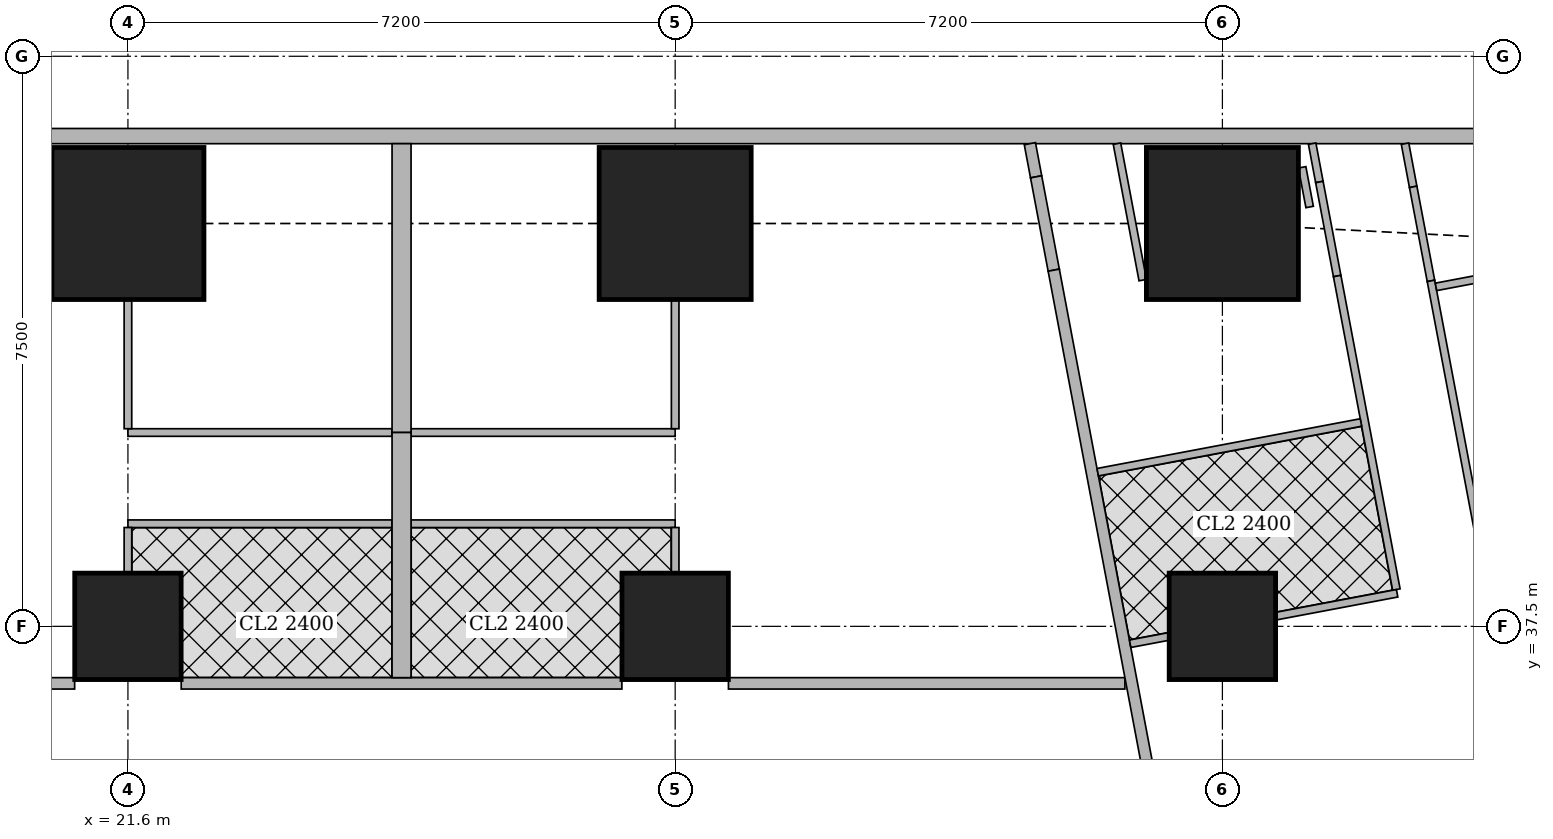
"""IFC4 building model, lengths in metres.
Left out: names, types, materials, properties, quantities, classifications, styles, units other than length and angle.
Written with IfcOpenShell. Run it as: python <this file> out.ifc"""

import sys

from ifc_helpers import new_model, si_unit, direction, frame, frame_2d, origin, origin_2d, place, context, subcontext, project, spatial, rectangle, extrude, element, fill, save


model = new_model("IFC4")
c1 = context("Model", 3, precision=1e-05, world=origin(), true_north=direction((0.0, 1.0)))
c2 = subcontext(c1, "Body", "Model", "MODEL_VIEW")
j1 = project(units=[si_unit("LENGTHUNIT", "METRE"), si_unit("PLANEANGLEUNIT", "RADIAN")], contexts=[c1])
p1 = place(None, origin())
s1 = spatial("IfcSite", under=j1, at=p1, CompositionType="ELEMENT")
p2 = place(p1, origin())
s2 = spatial("IfcBuilding", under=s1, at=p2, CompositionType="ELEMENT")
p3 = place(p2, frame((0.0, 0.0, 251.6)))
s3 = spatial("IfcBuildingStorey", under=s2, at=p3, CompositionType="ELEMENT", Elevation=251.6)
for number, where, z_axis, x_axis in (
    (1, (21.6, 37.5, 0.0), (0.0, 0.0, 1.0), (1.0, 0.0, 0.0)),
    (2, (28.8, 37.5, 0.0), (0.0, 0.0, 1.0), (1.0, 0.0, 0.0)),
    (3, (36.0, 37.5, 0.0), (0.0, 0.0, 1.0), (1.0, 0.0, 0.0)),
):
    element("IfcColumn", number, at=place(p3, frame(where, z_axis=z_axis, x_axis=x_axis)), inside=s3, PredefinedType="COLUMN", context=c2, shape_type="SweptSolid", body=[
        extrude(rectangle(XDim=1.4, YDim=1.4, at=origin_2d()), origin(), (0.0, 0.0, 1.0), 3.75),
    ])
for number, where, z_axis, x_axis in (
    (4, (21.6, 42.8, -0.25), (0.0, 0.0, 1.0), (1.0, 0.0, 0.0)),
    (5, (28.8, 42.8, -0.25), (0.0, 0.0, 1.0), (1.0, 0.0, 0.0)),
    (6, (36.0, 42.8, -0.25), (0.0, 0.0, 1.0), (1.0, 0.0, 0.0)),
):
    element("IfcColumn", number, at=place(p3, frame(where, z_axis=z_axis, x_axis=x_axis)), inside=s3, PredefinedType="COLUMN", context=c2, shape_type="SweptSolid", body=[
        extrude(rectangle(XDim=2.0, YDim=2.0, at=origin_2d()), origin(), (0.0, 0.0, 1.0), 4.0),
    ])
p4 = place(p3, frame((42.103, 43.95, 0.0), z_axis=(0.0, 0.0, 1.0), x_axis=(-1.0, 0.0, 0.0)))
e7 = element("IfcWall", 7, at=p4, inside=s3, PredefinedType="SOLIDWALL", context=c2, shape_type="SweptSolid", body=[
    extrude(rectangle(XDim=27.54, YDim=0.2, at=frame_2d((13.77, 0.0))), origin(), (0.0, 0.0, 1.0), 3.5),
])
p5 = place(p4, frame((10.603, 0.0, 0.9)))
e8 = element("IfcOpeningElement", 8, at=p5, cuts=e7, PredefinedType="OPENING", context=c2, shape_type="SweptSolid", body=[
    extrude(rectangle(XDim=1.8, YDim=1.5, at=frame_2d((0.9, 0.75))), frame((0.0, 0.11, 0.0), z_axis=(0.0, -1.0, 0.0), x_axis=(1.0, 0.0, 0.0)), (0.0, 0.0, 1.0), 0.22),
])
p6 = place(p4, frame((14.203, 0.0, 0.9)))
e9 = element("IfcOpeningElement", 9, at=p6, cuts=e7, PredefinedType="OPENING", context=c2, shape_type="SweptSolid", body=[
    extrude(rectangle(XDim=1.8, YDim=1.5, at=frame_2d((0.9, 0.75))), frame((0.0, 0.11, 0.0), z_axis=(0.0, -1.0, 0.0), x_axis=(1.0, 0.0, 0.0)), (0.0, 0.0, 1.0), 0.22),
])
p7 = place(p4, frame((17.803, 0.0, 0.9)))
e10 = element("IfcOpeningElement", 10, at=p7, cuts=e7, PredefinedType="OPENING", context=c2, shape_type="SweptSolid", body=[
    extrude(rectangle(XDim=1.8, YDim=1.5, at=frame_2d((0.9, 0.75))), frame((0.0, 0.11, 0.0), z_axis=(0.0, -1.0, 0.0), x_axis=(1.0, 0.0, 0.0)), (0.0, 0.0, 1.0), 0.22),
])
p8 = place(p4, frame((22.822, 0.0, 0.9)))
e11 = element("IfcOpeningElement", 11, at=p8, cuts=e7, PredefinedType="OPENING", context=c2, shape_type="SweptSolid", body=[
    extrude(rectangle(XDim=2.4, YDim=1.5, at=frame_2d((1.2, 0.75))), frame((0.0, 0.11, 0.0), z_axis=(0.0, -1.0, 0.0), x_axis=(1.0, 0.0, 0.0)), (0.0, 0.0, 1.0), 0.22),
])
p9 = place(p3, frame((16.001, 36.75, 0.0), z_axis=(0.0, 0.0, 1.0), x_axis=(1.0, 0.0, 0.0)))
e12 = element("IfcWall", 12, at=p9, inside=s3, PredefinedType="SOLIDWALL", context=c2, shape_type="SweptSolid", body=[
    extrude(rectangle(XDim=4.898, YDim=0.15, at=frame_2d((2.449, 0.0))), origin(), (0.0, 0.0, 1.0), 3.5),
])
p10 = place(p9, frame((1.074, 0.0, 0.0)))
e13 = element("IfcOpeningElement", 13, at=p10, cuts=e12, PredefinedType="OPENING", context=c2, shape_type="SweptSolid", body=[
    extrude(rectangle(XDim=1.0, YDim=2.1, at=frame_2d((0.5, 1.05))), frame((0.0, 0.085, 0.0), z_axis=(0.0, -1.0, 0.0), x_axis=(1.0, 0.0, 0.0)), (0.0, 0.0, 1.0), 0.17),
])
p11 = place(p3, frame((22.301, 36.75, 0.0), z_axis=(0.0, 0.0, 1.0), x_axis=(1.0, 0.0, 0.0)))
e14 = element("IfcWall", 14, at=p11, inside=s3, PredefinedType="SOLIDWALL", context=c2, shape_type="SweptSolid", body=[
    extrude(rectangle(XDim=5.798, YDim=0.15, at=frame_2d((2.899, 0.0))), origin(), (0.0, 0.0, 1.0), 3.5),
])
p12 = place(p3, frame((29.501, 36.75, 0.0), z_axis=(0.0, 0.0, 1.0), x_axis=(1.0, 0.0, 0.0)))
e15 = element("IfcWall", 15, at=p12, inside=s3, PredefinedType="SOLIDWALL", context=c2, shape_type="SweptSolid", body=[
    extrude(rectangle(XDim=5.216, YDim=0.15, at=frame_2d((2.608, 0.0))), origin(), (0.0, 0.0, 1.0), 3.5),
])
p13 = place(p12, frame((1.803, 0.0, 0.0)))
e16 = element("IfcOpeningElement", 16, at=p13, cuts=e15, PredefinedType="OPENING", context=c2, shape_type="SweptSolid", body=[
    extrude(rectangle(XDim=1.0, YDim=2.1, at=frame_2d((0.5, 1.05))), frame((0.0, 0.085, 0.0), z_axis=(0.0, -1.0, 0.0), x_axis=(1.0, 0.0, 0.0)), (0.0, 0.0, 1.0), 0.17),
])
p14 = place(p3, frame((33.467, 43.85, 0.0), z_axis=(0.0, 0.0, 1.0), x_axis=(0.184886516626, -0.982759877066, 0.0)))
e17 = element("IfcWall", 17, at=p14, inside=s3, PredefinedType="SOLIDWALL", context=c2, shape_type="SweptSolid", body=[
    extrude(rectangle(XDim=0.444, YDim=0.15, at=frame_2d((0.222, 0.0))), origin(), (0.0, 0.0, 1.0), 3.5),
])
p15 = place(p3, frame((33.549, 43.414, 0.0), z_axis=(0.0, 0.0, 1.0), x_axis=(0.185585816539, -0.982628060204, 0.0)))
e18 = element("IfcWall", 18, at=p15, inside=s3, PredefinedType="SOLIDWALL", context=c2, shape_type="SweptSolid", body=[
    extrude(rectangle(XDim=1.25, YDim=0.15, at=frame_2d((0.625, 0.0))), origin(), (0.0, 0.0, 1.0), 2.05),
])
p16 = place(p3, frame((33.781, 42.186, 0.0), z_axis=(0.0, 0.0, 1.0), x_axis=(0.185593518645, -0.9826266055, 0.0)))
e19 = element("IfcWall", 19, at=p16, inside=s3, PredefinedType="SOLIDWALL", context=c2, shape_type="SweptSolid", body=[
    extrude(rectangle(XDim=35.961, YDim=0.15, at=frame_2d((17.98, 0.0))), origin(), (0.0, 0.0, 1.0), 2.5),
])
p17 = place(p16, frame((7.183, 0.0, 0.0)))
e20 = element("IfcOpeningElement", 20, at=p17, cuts=e19, PredefinedType="OPENING", context=c2, shape_type="SweptSolid", body=[
    extrude(rectangle(XDim=1.0, YDim=2.1, at=frame_2d((0.5, 1.05))), frame((0.0, 0.085, 0.0), z_axis=(0.0, -1.0, 0.0), x_axis=(1.0, 0.0, 0.0)), (0.0, 0.0, 1.0), 0.17),
])
p18 = place(p16, frame((11.76, 0.0, 0.0)))
e21 = element("IfcOpeningElement", 21, at=p18, cuts=e19, PredefinedType="OPENING", context=c2, shape_type="SweptSolid", body=[
    extrude(rectangle(XDim=1.0, YDim=2.1, at=frame_2d((0.5, 1.05))), frame((0.0, 0.085, 0.0), z_axis=(0.0, -1.0, 0.0), x_axis=(1.0, 0.0, 0.0)), (0.0, 0.0, 1.0), 0.17),
])
p19 = place(p16, frame((23.863, 0.0, 0.0)))
e22 = element("IfcOpeningElement", 22, at=p19, cuts=e19, PredefinedType="OPENING", context=c2, shape_type="SweptSolid", body=[
    extrude(rectangle(XDim=1.0, YDim=2.1, at=frame_2d((0.5, 1.05))), frame((0.0, 0.085, 0.0), z_axis=(0.0, -1.0, 0.0), x_axis=(1.0, 0.0, 0.0)), (0.0, 0.0, 1.0), 0.17),
])
p20 = place(p16, frame((30.502, 0.0, 0.0)))
e23 = element("IfcOpeningElement", 23, at=p20, cuts=e19, PredefinedType="OPENING", context=c2, shape_type="SweptSolid", body=[
    extrude(rectangle(XDim=1.0, YDim=2.1, at=frame_2d((0.5, 1.05))), frame((0.0, 0.085, 0.0), z_axis=(0.0, -1.0, 0.0), x_axis=(1.0, 0.0, 0.0)), (0.0, 0.0, 1.0), 0.17),
])
p21 = place(p3, frame((34.952, 42.055, 0.0), z_axis=(0.0, 0.0, 1.0), x_axis=(-0.185490642006, 0.98264603074, 0.0)))
e24 = element("IfcWall", 24, at=p21, inside=s3, PredefinedType="PARTITIONING", context=c2, shape_type="SweptSolid", body=[
    extrude(rectangle(XDim=1.827, YDim=0.1, at=frame_2d((0.914, 0.0))), origin(), (0.0, 0.0, 1.0), 2.05),
])
p22 = place(p3, frame((37.049, 43.539, 0.0), z_axis=(0.0, 0.0, 1.0), x_axis=(0.186119495745, -0.982527115811, 0.0)))
e25 = element("IfcWall", 25, at=p22, inside=s3, PredefinedType="PARTITIONING", context=c2, shape_type="SweptSolid", body=[
    extrude(rectangle(XDim=0.531, YDim=0.1, at=frame_2d((0.266, 0.0))), origin(), (0.0, 0.0, 1.0), 2.05),
])
p23 = place(p3, frame((38.403, 43.85, 0.0), z_axis=(0.0, 0.0, 1.0), x_axis=(0.184976954078, -0.982742858768, 0.0)))
e26 = element("IfcWall", 26, at=p23, inside=s3, PredefinedType="PARTITIONING", context=c2, shape_type="SweptSolid", body=[
    extrude(rectangle(XDim=0.578, YDim=0.1, at=frame_2d((0.289, 0.0))), origin(), (0.0, 0.0, 1.0), 3.5),
])
p24 = place(p3, frame((38.51, 43.282, 0.0), z_axis=(0.0, 0.0, 1.0), x_axis=(0.185775287495, -0.982592256511, 0.0)))
e27 = element("IfcWall", 27, at=p24, inside=s3, PredefinedType="PARTITIONING", context=c2, shape_type="SweptSolid", body=[
    extrude(rectangle(XDim=1.259, YDim=0.1, at=frame_2d((0.629, 0.0))), origin(), (0.0, 0.0, 1.0), 2.05),
])
p25 = place(p24, frame((0.15, 0.0, 0.0)))
e28 = element("IfcOpeningElement", 28, at=p25, cuts=e27, PredefinedType="OPENING", context=c2, shape_type="SweptSolid", body=[
    extrude(rectangle(XDim=0.9, YDim=2.0, at=frame_2d((0.45, 1.0))), frame((0.0, 0.06, 0.0), z_axis=(0.0, -1.0, 0.0), x_axis=(1.0, 0.0, 0.0)), (0.0, 0.0, 1.0), 0.12),
])
p26 = place(p3, frame((38.744, 42.045, 0.0), z_axis=(0.0, 0.0, 1.0), x_axis=(0.185564988614, -0.982631993679, 0.0)))
e29 = element("IfcWall", 29, at=p26, inside=s3, PredefinedType="PARTITIONING", context=c2, shape_type="SweptSolid", body=[
    extrude(rectangle(XDim=5.265, YDim=0.1, at=frame_2d((2.633, 0.0))), origin(), (0.0, 0.0, 1.0), 3.5),
])
p27 = place(p26, frame((2.856, 0.0, 0.0)))
e30 = element("IfcOpeningElement", 30, at=p27, cuts=e29, PredefinedType="OPENING", context=c2, shape_type="SweptSolid", body=[
    extrude(rectangle(XDim=0.9, YDim=2.1, at=frame_2d((0.45, 1.05))), frame((0.0, 0.06, 0.0), z_axis=(0.0, -1.0, 0.0), x_axis=(1.0, 0.0, 0.0)), (0.0, 0.0, 1.0), 0.12),
])
p28 = place(p3, frame((37.181, 43.85, 0.0), z_axis=(0.0, 0.0, 1.0), x_axis=(0.185121727606, -0.982715597703, 0.0)))
e31 = element("IfcWall", 31, at=p28, inside=s3, PredefinedType="PARTITIONING", context=c2, shape_type="SweptSolid", body=[
    extrude(rectangle(XDim=0.513, YDim=0.1, at=frame_2d((0.256, 0.0))), origin(), (0.0, 0.0, 1.0), 3.5),
])
p29 = place(p3, frame((37.276, 43.346, 0.0), z_axis=(0.0, 0.0, 1.0), x_axis=(0.185962504646, -0.982556841544, 0.0)))
e32 = element("IfcWall", 32, at=p29, inside=s3, PredefinedType="PARTITIONING", context=c2, shape_type="SweptSolid", body=[
    extrude(rectangle(XDim=1.259, YDim=0.1, at=frame_2d((0.629, 0.0))), origin(), (0.0, 0.0, 1.0), 2.05),
])
p30 = place(p3, frame((37.51, 42.109, 0.0), z_axis=(0.0, 0.0, 1.0), x_axis=(0.185580569503, -0.98262905118, 0.0)))
e33 = element("IfcWall", 33, at=p30, inside=s3, PredefinedType="PARTITIONING", context=c2, shape_type="SweptSolid", body=[
    extrude(rectangle(XDim=4.198, YDim=0.1, at=frame_2d((2.099, 0.0))), origin(), (0.0, 0.0, 1.0), 3.5),
])
p31 = place(p30, frame((2.65, 0.0, 0.0)))
e34 = element("IfcOpeningElement", 34, at=p31, cuts=e33, PredefinedType="OPENING", context=c2, shape_type="SweptSolid", body=[
    extrude(rectangle(XDim=0.9, YDim=2.1, at=frame_2d((0.45, 1.05))), frame((0.0, 0.06, 0.0), z_axis=(0.0, -1.0, 0.0), x_axis=(1.0, 0.0, 0.0)), (0.0, 0.0, 1.0), 0.12),
])
p32 = place(p3, frame((40.657, 42.315, 0.0), z_axis=(0.0, 0.0, 1.0), x_axis=(-0.982622785543, -0.185613742305, 0.0)))
e35 = element("IfcWall", 35, at=p32, inside=s3, PredefinedType="PARTITIONING", context=c2, shape_type="SweptSolid", body=[
    extrude(rectangle(XDim=1.88, YDim=0.1, at=frame_2d((0.94, 0.0))), origin(), (0.0, 0.0, 1.0), 2.05),
])
p33 = place(p3, frame((37.823, 40.182, 0.0), z_axis=(0.0, 0.0, 1.0), x_axis=(-0.98263926043, -0.185526504472, 0.0)))
e36 = element("IfcWall", 36, at=p33, inside=s3, PredefinedType="PARTITIONING", context=c2, shape_type="SweptSolid", body=[
    extrude(rectangle(XDim=3.524, YDim=0.1, at=frame_2d((1.762, 0.0))), origin(), (0.0, 0.0, 1.0), 3.5),
])
p34 = place(p3, frame((38.299, 37.935, 0.0), z_axis=(0.0, 0.0, 1.0), x_axis=(-0.98263725405, -0.185537130931, 0.0)))
e37 = element("IfcWall", 37, at=p34, inside=s3, PredefinedType="PARTITIONING", context=c2, shape_type="SweptSolid", body=[
    extrude(rectangle(XDim=1.617, YDim=0.1, at=frame_2d((0.809, 0.0))), origin(), (0.0, 0.0, 1.0), 3.5),
])
p35 = place(p3, frame((35.29, 37.366, 0.0), z_axis=(0.0, 0.0, 1.0), x_axis=(-0.982715597703, -0.185121727606, 0.0)))
e38 = element("IfcWall", 38, at=p35, inside=s3, PredefinedType="PARTITIONING", context=c2, shape_type="SweptSolid", body=[
    extrude(rectangle(XDim=0.513, YDim=0.1, at=frame_2d((0.256, 0.0))), origin(), (0.0, 0.0, 1.0), 3.5),
])
p36 = place(p3, frame((21.6, 40.05, 0.0), z_axis=(0.0, 0.0, 1.0), x_axis=(1.0, 0.0, 0.0)))
e39 = element("IfcWall", 39, at=p36, inside=s3, PredefinedType="PARTITIONING", context=c2, shape_type="SweptSolid", body=[
    extrude(rectangle(XDim=3.475, YDim=0.1, at=frame_2d((1.737, 0.0))), origin(), (0.0, 0.0, 1.0), 3.5),
])
p37 = place(p36, frame((0.2, 0.0, 0.0)))
e40 = element("IfcOpeningElement", 40, at=p37, cuts=e39, PredefinedType="OPENING", context=c2, shape_type="SweptSolid", body=[
    extrude(rectangle(XDim=0.9, YDim=2.1, at=frame_2d((0.45, 1.05))), frame((0.0, 0.06, 0.0), z_axis=(0.0, -1.0, 0.0), x_axis=(1.0, 0.0, 0.0)), (0.0, 0.0, 1.0), 0.12),
])
p38 = place(p3, frame((21.6, 38.85, 0.0), z_axis=(0.0, 0.0, 1.0), x_axis=(1.0, 0.0, 0.0)))
e41 = element("IfcWall", 41, at=p38, inside=s3, PredefinedType="PARTITIONING", context=c2, shape_type="SweptSolid", body=[
    extrude(rectangle(XDim=3.475, YDim=0.1, at=frame_2d((1.737, 0.0))), origin(), (0.0, 0.0, 1.0), 3.5),
])
p39 = place(p38, frame((1.35, 0.0, 0.0)))
e42 = element("IfcOpeningElement", 42, at=p39, cuts=e41, PredefinedType="OPENING", context=c2, shape_type="SweptSolid", body=[
    extrude(rectangle(XDim=0.9, YDim=2.1, at=frame_2d((0.45, 1.05))), frame((0.0, 0.06, 0.0), z_axis=(0.0, -1.0, 0.0), x_axis=(1.0, 0.0, 0.0)), (0.0, 0.0, 1.0), 0.12),
])
p40 = place(p3, frame((21.6, 40.1, 0.0), z_axis=(0.0, 0.0, 1.0), x_axis=(0.0, 1.0, 0.0)))
e43 = element("IfcWall", 43, at=p40, inside=s3, PredefinedType="PARTITIONING", context=c2, shape_type="SweptSolid", body=[
    extrude(rectangle(XDim=1.699, YDim=0.1, at=frame_2d((0.85, 0.0))), origin(), (0.0, 0.0, 1.0), 3.5),
])
p41 = place(p3, frame((21.6, 38.201, 0.0), z_axis=(0.0, 0.0, 1.0), x_axis=(0.0, 1.0, 0.0)))
e44 = element("IfcWall", 44, at=p41, inside=s3, PredefinedType="PARTITIONING", context=c2, shape_type="SweptSolid", body=[
    extrude(rectangle(XDim=0.599, YDim=0.1, at=frame_2d((0.3, 0.0))), origin(), (0.0, 0.0, 1.0), 3.5),
])
p42 = place(p3, frame((25.325, 40.05, 0.0), z_axis=(0.0, 0.0, 1.0), x_axis=(1.0, 0.0, 0.0)))
e45 = element("IfcWall", 45, at=p42, inside=s3, PredefinedType="PARTITIONING", context=c2, shape_type="SweptSolid", body=[
    extrude(rectangle(XDim=3.475, YDim=0.1, at=frame_2d((1.738, 0.0))), origin(), (0.0, 0.0, 1.0), 3.5),
])
p43 = place(p42, frame((2.375, 0.0, 0.0)))
e46 = element("IfcOpeningElement", 46, at=p43, cuts=e45, PredefinedType="OPENING", context=c2, shape_type="SweptSolid", body=[
    extrude(rectangle(XDim=0.9, YDim=2.1, at=frame_2d((0.45, 1.05))), frame((0.0, 0.06, 0.0), z_axis=(0.0, -1.0, 0.0), x_axis=(1.0, 0.0, 0.0)), (0.0, 0.0, 1.0), 0.12),
])
p44 = place(p3, frame((25.325, 38.85, 0.0), z_axis=(0.0, 0.0, 1.0), x_axis=(1.0, 0.0, 0.0)))
e47 = element("IfcWall", 47, at=p44, inside=s3, PredefinedType="PARTITIONING", context=c2, shape_type="SweptSolid", body=[
    extrude(rectangle(XDim=3.475, YDim=0.1, at=frame_2d((1.738, 0.0))), origin(), (0.0, 0.0, 1.0), 3.5),
])
p45 = place(p44, frame((1.225, 0.0, 0.0)))
e48 = element("IfcOpeningElement", 48, at=p45, cuts=e47, PredefinedType="OPENING", context=c2, shape_type="SweptSolid", body=[
    extrude(rectangle(XDim=0.9, YDim=2.1, at=frame_2d((0.45, 1.05))), frame((0.0, 0.06, 0.0), z_axis=(0.0, -1.0, 0.0), x_axis=(1.0, 0.0, 0.0)), (0.0, 0.0, 1.0), 0.12),
])
p46 = place(p3, frame((28.8, 40.1, 0.0), z_axis=(0.0, 0.0, 1.0), x_axis=(0.0, 1.0, 0.0)))
e49 = element("IfcWall", 49, at=p46, inside=s3, PredefinedType="PARTITIONING", context=c2, shape_type="SweptSolid", body=[
    extrude(rectangle(XDim=1.699, YDim=0.1, at=frame_2d((0.85, 0.0))), origin(), (0.0, 0.0, 1.0), 3.5),
])
p47 = place(p3, frame((28.8, 38.201, 0.0), z_axis=(0.0, 0.0, 1.0), x_axis=(0.0, 1.0, 0.0)))
e50 = element("IfcWall", 50, at=p47, inside=s3, PredefinedType="PARTITIONING", context=c2, shape_type="SweptSolid", body=[
    extrude(rectangle(XDim=0.599, YDim=0.1, at=frame_2d((0.3, 0.0))), origin(), (0.0, 0.0, 1.0), 3.5),
])
p48 = place(p3, frame((25.2, 40.05, 0.0), z_axis=(0.0, 0.0, 1.0), x_axis=(0.0, 1.0, 0.0)))
e51 = element("IfcWall", 51, at=p48, inside=s3, PredefinedType="SOLIDWALL", context=c2, shape_type="SweptSolid", body=[
    extrude(rectangle(XDim=3.8, YDim=0.25, at=frame_2d((1.9, 0.0))), origin(), (0.0, 0.0, 1.0), 2.05),
])
p49 = place(p3, frame((25.2, 36.825, 0.0), z_axis=(0.0, 0.0, 1.0), x_axis=(0.0, 1.0, 0.0)))
e52 = element("IfcWall", 52, at=p49, inside=s3, PredefinedType="SOLIDWALL", context=c2, shape_type="SweptSolid", body=[
    extrude(rectangle(XDim=3.225, YDim=0.25, at=frame_2d((1.613, 0.0))), origin(), (0.0, 0.0, 1.0), 3.5),
])
p50 = place(p5, origin())
e53 = element("IfcWindow", 53, at=p50, inside=s3, PartitioningType="SINGLE_PANEL", PredefinedType="WINDOW", context=c2, shape_type="SweptSolid", body=[
    extrude(rectangle(XDim=1.8, YDim=1.5, at=frame_2d((0.9, 0.75))), frame((0.0, 0.03, 0.0), z_axis=(0.0, -1.0, 0.0), x_axis=(1.0, 0.0, 0.0)), (0.0, 0.0, 1.0), 0.06),
])
fill(e8, e53)
p51 = place(p6, origin())
e54 = element("IfcWindow", 54, at=p51, inside=s3, PartitioningType="SINGLE_PANEL", PredefinedType="WINDOW", context=c2, shape_type="SweptSolid", body=[
    extrude(rectangle(XDim=1.8, YDim=1.5, at=frame_2d((0.9, 0.75))), frame((0.0, 0.03, 0.0), z_axis=(0.0, -1.0, 0.0), x_axis=(1.0, 0.0, 0.0)), (0.0, 0.0, 1.0), 0.06),
])
fill(e9, e54)
p52 = place(p7, origin())
e55 = element("IfcWindow", 55, at=p52, inside=s3, PartitioningType="SINGLE_PANEL", PredefinedType="WINDOW", context=c2, shape_type="SweptSolid", body=[
    extrude(rectangle(XDim=1.8, YDim=1.5, at=frame_2d((0.9, 0.75))), frame((0.0, 0.03, 0.0), z_axis=(0.0, -1.0, 0.0), x_axis=(1.0, 0.0, 0.0)), (0.0, 0.0, 1.0), 0.06),
])
fill(e10, e55)
p53 = place(p25, origin())
e56 = element("IfcDoor", 56, at=p53, inside=s3, OperationType="SINGLE_SWING_LEFT", PredefinedType="DOOR", context=c2, shape_type="SweptSolid", body=[
    extrude(rectangle(XDim=0.9, YDim=2.0, at=frame_2d((0.45, 1.0))), frame((0.0, 0.025, 0.0), z_axis=(0.0, -1.0, 0.0), x_axis=(1.0, 0.0, 0.0)), (0.0, 0.0, 1.0), 0.05),
])
fill(e28, e56)
p54 = place(p27, origin())
e57 = element("IfcDoor", 57, at=p54, inside=s3, OperationType="SINGLE_SWING_RIGHT", PredefinedType="DOOR", context=c2, shape_type="SweptSolid", body=[
    extrude(rectangle(XDim=0.9, YDim=2.1, at=frame_2d((0.45, 1.05))), frame((0.0, 0.025, 0.0), z_axis=(0.0, -1.0, 0.0), x_axis=(1.0, 0.0, 0.0)), (0.0, 0.0, 1.0), 0.05),
])
fill(e30, e57)
p55 = place(p31, origin())
e58 = element("IfcDoor", 58, at=p55, inside=s3, OperationType="SINGLE_SWING_LEFT", PredefinedType="DOOR", context=c2, shape_type="SweptSolid", body=[
    extrude(rectangle(XDim=0.9, YDim=2.1, at=frame_2d((0.45, 1.05))), frame((0.0, 0.025, 0.0), z_axis=(0.0, -1.0, 0.0), x_axis=(1.0, 0.0, 0.0)), (0.0, 0.0, 1.0), 0.05),
])
fill(e34, e58)
p56 = place(p37, origin())
e59 = element("IfcDoor", 59, at=p56, inside=s3, OperationType="SINGLE_SWING_LEFT", PredefinedType="DOOR", context=c2, shape_type="SweptSolid", body=[
    extrude(rectangle(XDim=0.9, YDim=2.1, at=frame_2d((0.45, 1.05))), frame((0.0, 0.025, 0.0), z_axis=(0.0, -1.0, 0.0), x_axis=(1.0, 0.0, 0.0)), (0.0, 0.0, 1.0), 0.05),
])
fill(e40, e59)
p57 = place(p39, origin())
e60 = element("IfcDoor", 60, at=p57, inside=s3, OperationType="SINGLE_SWING_LEFT", PredefinedType="DOOR", context=c2, shape_type="SweptSolid", body=[
    extrude(rectangle(XDim=0.9, YDim=2.1, at=frame_2d((0.45, 1.05))), frame((0.0, 0.025, 0.0), z_axis=(0.0, -1.0, 0.0), x_axis=(1.0, 0.0, 0.0)), (0.0, 0.0, 1.0), 0.05),
])
fill(e42, e60)
p58 = place(p43, origin())
e61 = element("IfcDoor", 61, at=p58, inside=s3, OperationType="SINGLE_SWING_RIGHT", PredefinedType="DOOR", context=c2, shape_type="SweptSolid", body=[
    extrude(rectangle(XDim=0.9, YDim=2.1, at=frame_2d((0.45, 1.05))), frame((0.0, 0.025, 0.0), z_axis=(0.0, -1.0, 0.0), x_axis=(1.0, 0.0, 0.0)), (0.0, 0.0, 1.0), 0.05),
])
fill(e46, e61)
p59 = place(p45, origin())
e62 = element("IfcDoor", 62, at=p59, inside=s3, OperationType="SINGLE_SWING_RIGHT", PredefinedType="DOOR", context=c2, shape_type="SweptSolid", body=[
    extrude(rectangle(XDim=0.9, YDim=2.1, at=frame_2d((0.45, 1.05))), frame((0.0, 0.025, 0.0), z_axis=(0.0, -1.0, 0.0), x_axis=(1.0, 0.0, 0.0)), (0.0, 0.0, 1.0), 0.05),
])
fill(e48, e62)
p60 = place(p13, origin())
e63 = element("IfcDoor", 63, at=p60, inside=s3, OperationType="SINGLE_SWING_LEFT", PredefinedType="DOOR", context=c2, shape_type="SweptSolid", body=[
    extrude(rectangle(XDim=1.0, YDim=2.1, at=frame_2d((0.5, 1.05))), frame((0.0, 0.025, 0.0), z_axis=(0.0, -1.0, 0.0), x_axis=(1.0, 0.0, 0.0)), (0.0, 0.0, 1.0), 0.05),
])
fill(e16, e63)
save(model, sys.argv[1])
